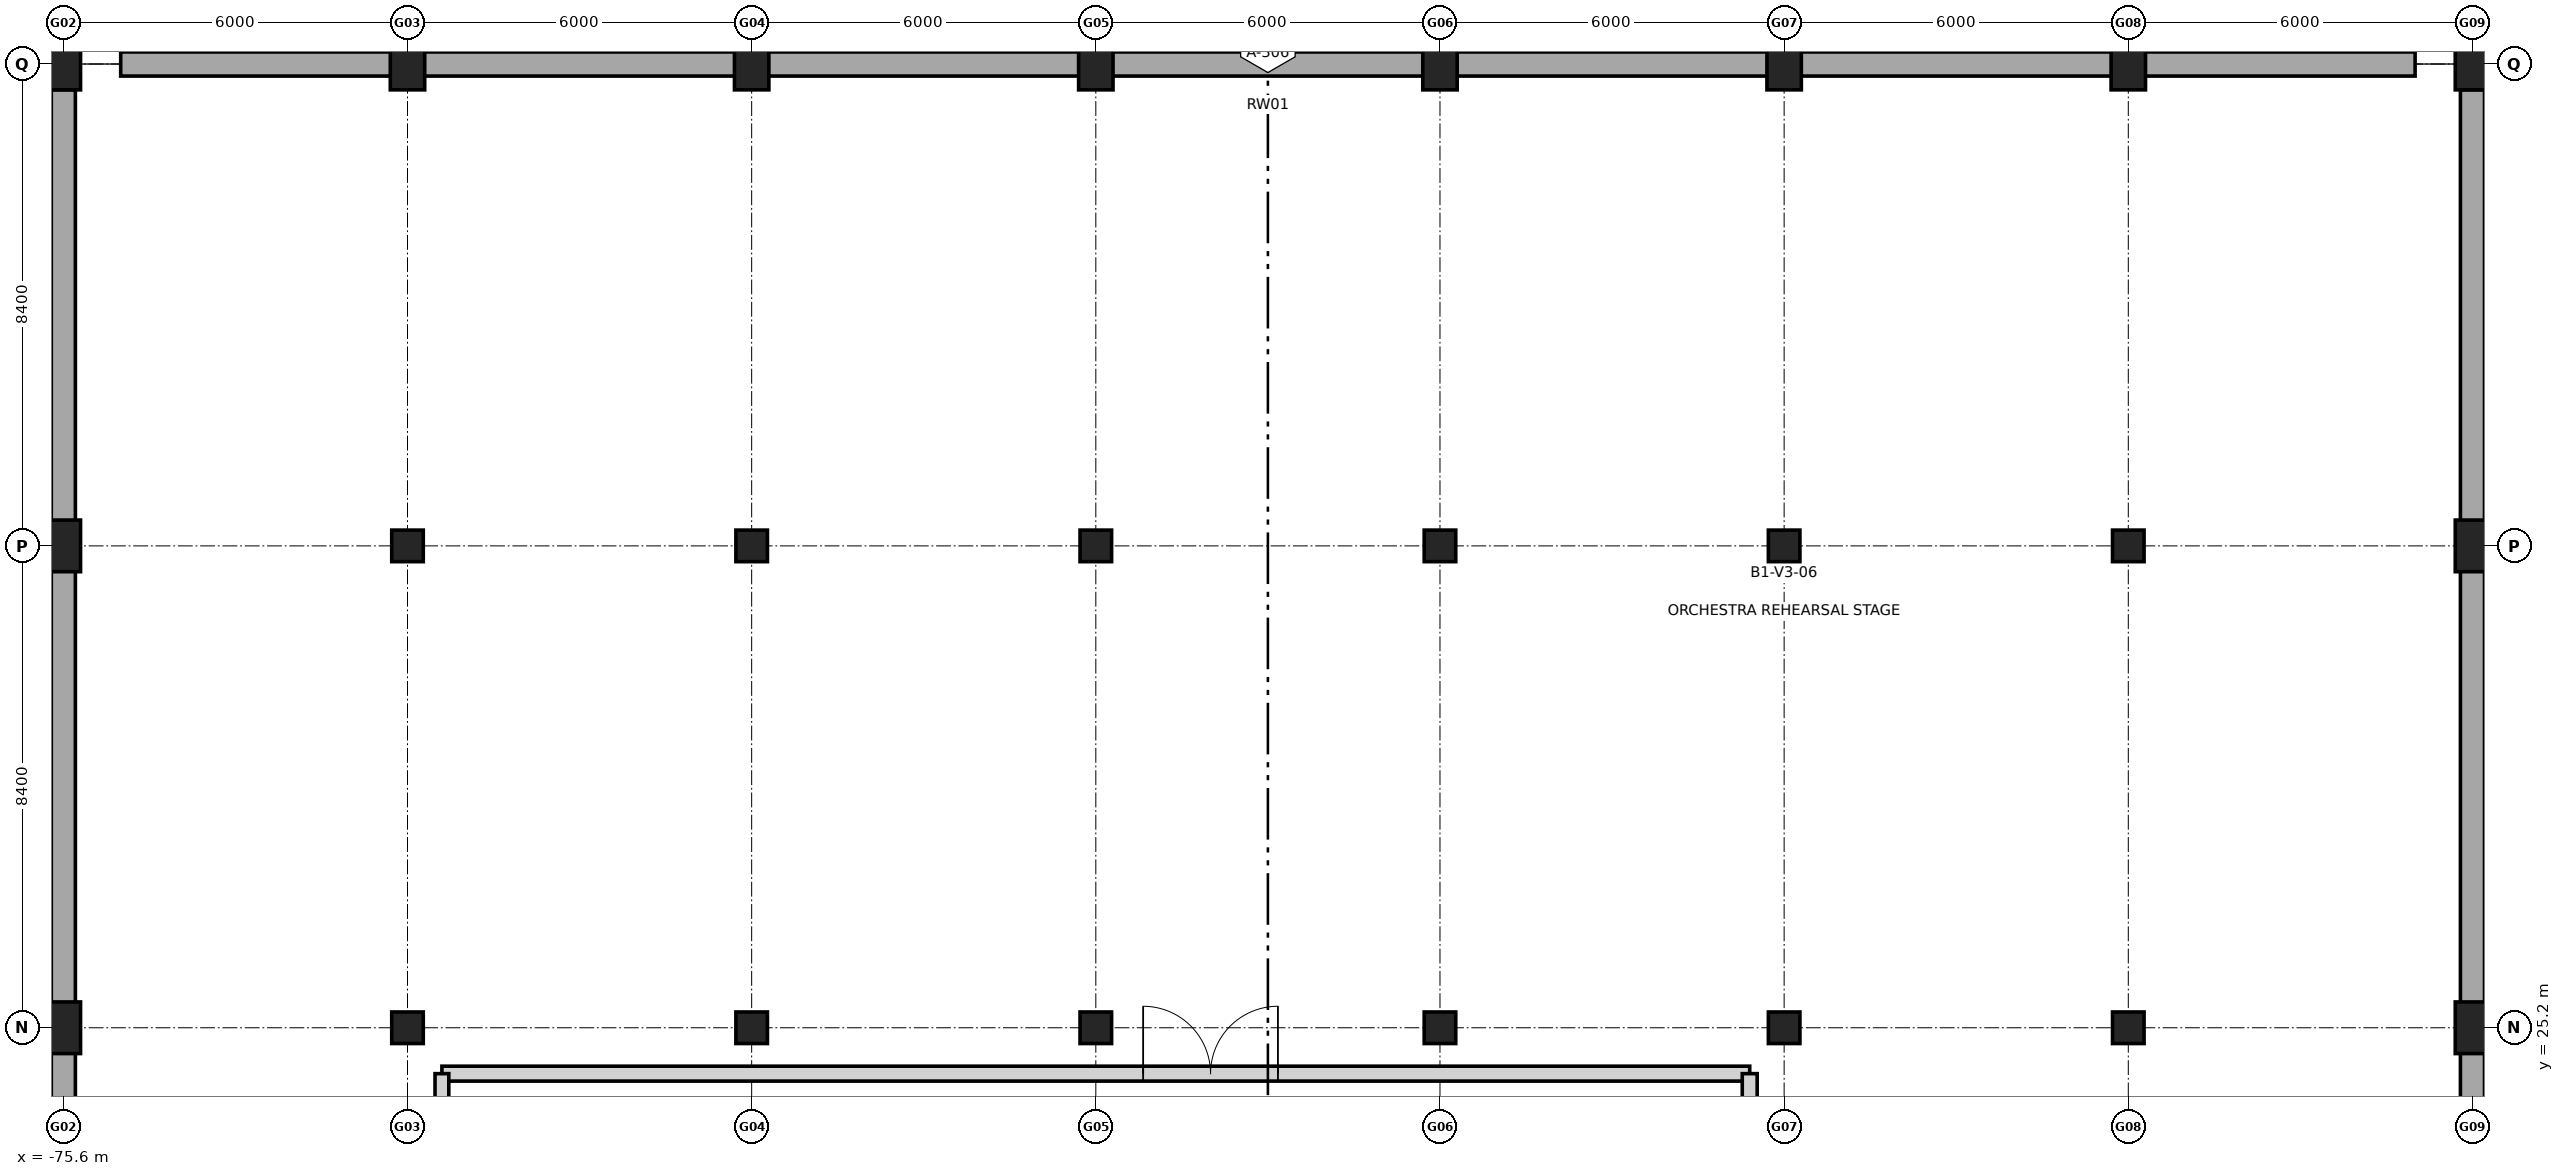
"""IFC4 building model, lengths in metres.
Left out: names, types, materials, properties, quantities, classifications, styles, units other than length and angle.
Written with IfcOpenShell. Run it as: python <this file> out.ifc"""

import sys

from ifc_helpers import new_model, si_unit, direction, frame, frame_2d, origin, origin_2d, place, context, subcontext, project, spatial, rectangle, extrude, element, fill, save


model = new_model("IFC4")
c1 = context("Model", 3, precision=1e-05, world=origin(), true_north=direction((0.0, 1.0)))
c2 = subcontext(c1, "Body", "Model", "MODEL_VIEW")
j1 = project(units=[si_unit("LENGTHUNIT", "METRE"), si_unit("PLANEANGLEUNIT", "RADIAN")], contexts=[c1])
p1 = place(None, origin())
s1 = spatial("IfcSite", under=j1, at=p1, CompositionType="ELEMENT")
p2 = place(p1, origin())
s2 = spatial("IfcBuilding", under=s1, at=p2, CompositionType="ELEMENT")
p3 = place(p2, frame((0.0, 0.0, -5.4)))
s3 = spatial("IfcBuildingStorey", under=s2, at=p3, CompositionType="ELEMENT", Elevation=-5.4)
for number, where, z_axis, x_axis in (
    (1, (-75.6, 25.2, 0.0), (0.0, 0.0, 1.0), (1.0, 0.0, 0.0)),
    (2, (-75.6, 33.6, 0.0), (0.0, 0.0, 1.0), (1.0, 0.0, 0.0)),
    (3, (-75.6, 42.0, 0.0), (0.0, 0.0, 1.0), (1.0, 0.0, 0.0)),
):
    element("IfcColumn", number, at=place(p3, frame(where, z_axis=z_axis, x_axis=x_axis)), inside=s3, PredefinedType="COLUMN", context=c2, shape_type="SweptSolid", body=[
        extrude(rectangle(XDim=0.6, YDim=0.9, at=origin_2d()), origin(), (0.0, 0.0, 1.0), 5.4),
    ])
for number, where, z_axis, x_axis in (
    (4, (-69.6, 25.2, 0.0), (0.0, 0.0, 1.0), (1.0, 0.0, 0.0)),
    (5, (-69.6, 33.6, 0.0), (0.0, 0.0, 1.0), (1.0, 0.0, 0.0)),
):
    element("IfcColumn", number, at=place(p3, frame(where, z_axis=z_axis, x_axis=x_axis)), inside=s3, PredefinedType="COLUMN", context=c2, shape_type="SweptSolid", body=[
        extrude(rectangle(XDim=0.55, YDim=0.55, at=origin_2d()), origin(), (0.0, 0.0, 1.0), 5.4),
    ])
p4 = place(p3, frame((-69.6, 42.0, 0.0), z_axis=(0.0, 0.0, 1.0), x_axis=(1.0, 0.0, 0.0)))
e6 = element("IfcColumn", 6, at=p4, inside=s3, PredefinedType="COLUMN", context=c2, shape_type="SweptSolid", body=[
    extrude(rectangle(XDim=0.6, YDim=0.9, at=origin_2d()), origin(), (0.0, 0.0, 1.0), 5.4),
])
for number, where, z_axis, x_axis in (
    (7, (-63.6, 25.2, 0.0), (0.0, 0.0, 1.0), (1.0, 0.0, 0.0)),
    (8, (-63.6, 33.6, 0.0), (0.0, 0.0, 1.0), (1.0, 0.0, 0.0)),
):
    element("IfcColumn", number, at=place(p3, frame(where, z_axis=z_axis, x_axis=x_axis)), inside=s3, PredefinedType="COLUMN", context=c2, shape_type="SweptSolid", body=[
        extrude(rectangle(XDim=0.55, YDim=0.55, at=origin_2d()), origin(), (0.0, 0.0, 1.0), 5.4),
    ])
p5 = place(p3, frame((-63.6, 42.0, 0.0), z_axis=(0.0, 0.0, 1.0), x_axis=(1.0, 0.0, 0.0)))
e9 = element("IfcColumn", 9, at=p5, inside=s3, PredefinedType="COLUMN", context=c2, shape_type="SweptSolid", body=[
    extrude(rectangle(XDim=0.6, YDim=0.9, at=origin_2d()), origin(), (0.0, 0.0, 1.0), 5.4),
])
for number, where, z_axis, x_axis in (
    (10, (-57.6, 25.2, 0.0), (0.0, 0.0, 1.0), (1.0, 0.0, 0.0)),
    (11, (-57.6, 33.6, 0.0), (0.0, 0.0, 1.0), (1.0, 0.0, 0.0)),
):
    element("IfcColumn", number, at=place(p3, frame(where, z_axis=z_axis, x_axis=x_axis)), inside=s3, PredefinedType="COLUMN", context=c2, shape_type="SweptSolid", body=[
        extrude(rectangle(XDim=0.55, YDim=0.55, at=origin_2d()), origin(), (0.0, 0.0, 1.0), 5.4),
    ])
p6 = place(p3, frame((-57.6, 42.0, 0.0), z_axis=(0.0, 0.0, 1.0), x_axis=(1.0, 0.0, 0.0)))
e12 = element("IfcColumn", 12, at=p6, inside=s3, PredefinedType="COLUMN", context=c2, shape_type="SweptSolid", body=[
    extrude(rectangle(XDim=0.6, YDim=0.9, at=origin_2d()), origin(), (0.0, 0.0, 1.0), 5.4),
])
for number, where, z_axis, x_axis in (
    (13, (-51.6, 25.2, 0.0), (0.0, 0.0, 1.0), (1.0, 0.0, 0.0)),
    (14, (-51.6, 33.6, 0.0), (0.0, 0.0, 1.0), (1.0, 0.0, 0.0)),
):
    element("IfcColumn", number, at=place(p3, frame(where, z_axis=z_axis, x_axis=x_axis)), inside=s3, PredefinedType="COLUMN", context=c2, shape_type="SweptSolid", body=[
        extrude(rectangle(XDim=0.55, YDim=0.55, at=origin_2d()), origin(), (0.0, 0.0, 1.0), 5.4),
    ])
p7 = place(p3, frame((-51.6, 42.0, 0.0), z_axis=(0.0, 0.0, 1.0), x_axis=(1.0, 0.0, 0.0)))
e15 = element("IfcColumn", 15, at=p7, inside=s3, PredefinedType="COLUMN", context=c2, shape_type="SweptSolid", body=[
    extrude(rectangle(XDim=0.6, YDim=0.9, at=origin_2d()), origin(), (0.0, 0.0, 1.0), 5.4),
])
for number, where, z_axis, x_axis in (
    (16, (-45.6, 25.2, 0.0), (0.0, 0.0, 1.0), (1.0, 0.0, 0.0)),
    (17, (-45.6, 33.6, 0.0), (0.0, 0.0, 1.0), (1.0, 0.0, 0.0)),
):
    element("IfcColumn", number, at=place(p3, frame(where, z_axis=z_axis, x_axis=x_axis)), inside=s3, PredefinedType="COLUMN", context=c2, shape_type="SweptSolid", body=[
        extrude(rectangle(XDim=0.55, YDim=0.55, at=origin_2d()), origin(), (0.0, 0.0, 1.0), 5.4),
    ])
p8 = place(p3, frame((-45.6, 42.0, 0.0), z_axis=(0.0, 0.0, 1.0), x_axis=(1.0, 0.0, 0.0)))
e18 = element("IfcColumn", 18, at=p8, inside=s3, PredefinedType="COLUMN", context=c2, shape_type="SweptSolid", body=[
    extrude(rectangle(XDim=0.6, YDim=0.9, at=origin_2d()), origin(), (0.0, 0.0, 1.0), 5.4),
])
for number, where, z_axis, x_axis in (
    (19, (-39.6, 25.2, 0.0), (0.0, 0.0, 1.0), (1.0, 0.0, 0.0)),
    (20, (-39.6, 33.6, 0.0), (0.0, 0.0, 1.0), (1.0, 0.0, 0.0)),
):
    element("IfcColumn", number, at=place(p3, frame(where, z_axis=z_axis, x_axis=x_axis)), inside=s3, PredefinedType="COLUMN", context=c2, shape_type="SweptSolid", body=[
        extrude(rectangle(XDim=0.55, YDim=0.55, at=origin_2d()), origin(), (0.0, 0.0, 1.0), 5.4),
    ])
for number, where, z_axis, x_axis in (
    (21, (-39.6, 42.0, 0.0), (0.0, 0.0, 1.0), (1.0, 0.0, 0.0)),
    (22, (-33.6, 25.2, 0.0), (0.0, 0.0, 1.0), (1.0, 0.0, 0.0)),
    (23, (-33.6, 33.6, 0.0), (0.0, 0.0, 1.0), (1.0, 0.0, 0.0)),
    (24, (-33.6, 42.0, 0.0), (0.0, 0.0, 1.0), (1.0, 0.0, 0.0)),
):
    element("IfcColumn", number, at=place(p3, frame(where, z_axis=z_axis, x_axis=x_axis)), inside=s3, PredefinedType="COLUMN", context=c2, shape_type="SweptSolid", body=[
        extrude(rectangle(XDim=0.6, YDim=0.9, at=origin_2d()), origin(), (0.0, 0.0, 1.0), 5.4),
    ])
for number, where, z_axis, x_axis in (
    (25, (-75.6, -16.35, 0.0), (0.0, 0.0, 1.0), (0.0, 1.0, 0.0)),
    (26, (-33.6, -16.35, 0.0), (0.0, 0.0, 1.0), (0.0, 1.0, 0.0)),
):
    element("IfcWall", number, at=place(p3, frame(where, z_axis=z_axis, x_axis=x_axis)), inside=s3, PredefinedType="USERDEFINED", context=c2, shape_type="SweptSolid", body=[
        extrude(rectangle(XDim=57.9, YDim=0.42, at=frame_2d((28.95, 0.0))), origin(), (0.0, 0.0, 1.0), 5.11),
    ])
p9 = place(p3, frame((-74.6, 42.0, 0.0), z_axis=(0.0, 0.0, 1.0), x_axis=(1.0, 0.0, 0.0)))
e27 = element("IfcWall", 27, at=p9, inside=s3, PredefinedType="USERDEFINED", context=c2, shape_type="SweptSolid", body=[
    extrude(rectangle(XDim=40.0, YDim=0.42, at=frame_2d((20.0, 0.0))), origin(), (0.0, 0.0, 1.0), 5.11),
])
p10 = place(p3, frame((-69.0, 24.4, 0.0), z_axis=(0.0, 0.0, 1.0), x_axis=(1.0, 0.0, 0.0)))
e28 = element("IfcWall", 28, at=p10, inside=s3, PredefinedType="PARTITIONING", context=c2, shape_type="SweptSolid", body=[
    extrude(rectangle(XDim=22.8, YDim=0.26, at=frame_2d((11.4, 0.0))), origin(), (0.0, 0.0, 1.0), 5.02),
])
p11 = place(p10, frame((12.225, 0.0, 0.0)))
e29 = element("IfcOpeningElement", 29, at=p11, cuts=e28, PredefinedType="OPENING", context=c2, shape_type="SweptSolid", body=[
    extrude(rectangle(XDim=2.35, YDim=2.5, at=frame_2d((1.175, 1.25))), frame((0.0, 0.14, 0.0), z_axis=(0.0, -1.0, 0.0), x_axis=(1.0, 0.0, 0.0)), (0.0, 0.0, 1.0), 0.28),
])
p12 = place(p3, frame((-69.0, 17.0, 0.0), z_axis=(0.0, 0.0, 1.0), x_axis=(0.0, 1.0, 0.0)))
e30 = element("IfcWall", 30, at=p12, inside=s3, PredefinedType="PARTITIONING", context=c2, shape_type="SweptSolid", body=[
    extrude(rectangle(XDim=7.4, YDim=0.24, at=frame_2d((3.7, 0.0))), origin(), (0.0, 0.0, 1.0), 5.02),
])
p13 = place(p12, frame((1.45, 0.0, 0.0)))
e31 = element("IfcOpeningElement", 31, at=p13, cuts=e30, PredefinedType="OPENING", context=c2, shape_type="SweptSolid", body=[
    extrude(rectangle(XDim=1.12, YDim=2.25, at=frame_2d((0.56, 1.125))), frame((0.0, 0.13, 0.0), z_axis=(0.0, -1.0, 0.0), x_axis=(1.0, 0.0, 0.0)), (0.0, 0.0, 1.0), 0.26),
])
p14 = place(p3, frame((-46.2, 17.0, 0.0), z_axis=(0.0, 0.0, 1.0), x_axis=(0.0, 1.0, 0.0)))
e32 = element("IfcWall", 32, at=p14, inside=s3, PredefinedType="PARTITIONING", context=c2, shape_type="SweptSolid", body=[
    extrude(rectangle(XDim=7.4, YDim=0.26, at=frame_2d((3.7, 0.0))), origin(), (0.0, 0.0, 1.0), 5.02),
])
p15 = place(p11, origin())
e33 = element("IfcDoor", 33, at=p15, inside=s3, OperationType="DOUBLE_DOOR_SINGLE_SWING", PredefinedType="DOOR", context=c2, shape_type="SweptSolid", body=[
    extrude(rectangle(XDim=2.35, YDim=2.5, at=frame_2d((1.175, 1.25))), frame((0.0, 0.025, 0.0), z_axis=(0.0, -1.0, 0.0), x_axis=(1.0, 0.0, 0.0)), (0.0, 0.0, 1.0), 0.05),
])
fill(e29, e33)
save(model, sys.argv[1])
